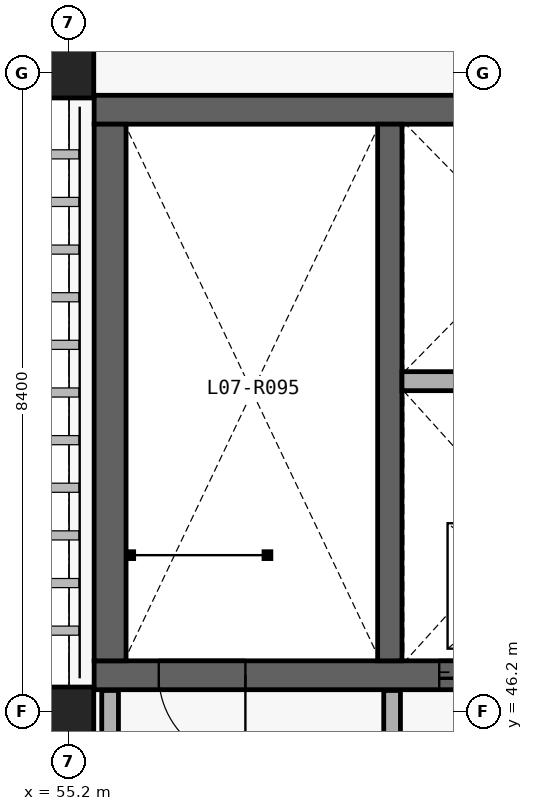
"""IFC4 building model, lengths in metres.
Left out: names, types, materials, properties, quantities, classifications, styles, units other than length and angle.
Written with IfcOpenShell. Run it as: python <this file> out.ifc"""

import sys

from ifc_helpers import new_model, si_unit, direction, frame, frame_2d, origin_with_axes, origin_2d_with_axis, place, context, subcontext, project, spatial, rectangle, circle, extrude, element, fill, save


model = new_model("IFC4")
c1 = context("Model", 3, precision=1e-05, world=origin_with_axes(), true_north=direction((0.0, 1.0)))
c2 = subcontext(c1, "Body", "Model", "MODEL_VIEW")
j1 = project(units=[si_unit("LENGTHUNIT", "METRE"), si_unit("PLANEANGLEUNIT", "RADIAN")], contexts=[c1])
p1 = place(None, origin_with_axes())
s1 = spatial("IfcSite", under=j1, at=p1, CompositionType="ELEMENT")
p2 = place(p1, origin_with_axes())
s2 = spatial("IfcBuilding", under=s1, at=p2, CompositionType="ELEMENT")
p3 = place(p2, frame((0.0, 0.0, 34.5), z_axis=(0.0, 0.0, 1.0), x_axis=(1.0, 0.0, 0.0)))
s3 = spatial("IfcBuildingStorey", under=s2, at=p3, CompositionType="ELEMENT", Elevation=34.5)
p4 = place(None, frame((55.53, 46.68, 34.5), z_axis=(0.0, 0.0, 1.0), x_axis=(1.0, 0.0, 0.0)))
e1 = element("IfcWall", 1, at=p4, inside=s3, PredefinedType="SHEAR", context=c2, shape_type="SweptSolid", body=[
    extrude(rectangle(XDim=7.74, YDim=0.38, at=frame_2d((3.87, 0.0), x_axis=(1.0, 0.0))), origin_with_axes(), (0.0, 0.0, 1.0), 4.5),
])
p5 = place(None, frame((56.95, 46.68, 34.5), z_axis=(0.0, 0.0, 1.0), x_axis=(1.0, 0.0, 0.0)))
e2 = element("IfcOpeningElement", 2, at=p5, cuts=e1, PredefinedType="OPENING", context=c2, shape_type="SweptSolid", body=[
    extrude(rectangle(XDim=1.14, YDim=2.18, at=frame_2d((0.0, 1.09), x_axis=(1.0, 0.0))), frame((0.0, 0.2, 0.0), z_axis=(0.0, -1.0, 0.0), x_axis=(1.0, 0.0, 0.0)), (0.0, 0.0, 1.0), 0.4),
])
p6 = place(None, frame((60.65, 46.68, 34.5), z_axis=(0.0, 0.0, 1.0), x_axis=(1.0, 0.0, 0.0)))
e3 = element("IfcOpeningElement", 3, at=p6, cuts=e1, PredefinedType="OPENING", context=c2, shape_type="SweptSolid", body=[
    extrude(rectangle(XDim=1.16, YDim=2.2, at=frame_2d((0.0, 1.1), x_axis=(1.0, 0.0))), frame((0.0, 0.2, 0.0), z_axis=(0.0, -1.0, 0.0), x_axis=(1.0, 0.0, 0.0)), (0.0, 0.0, 1.0), 0.4),
])
p7 = place(None, frame((63.27, 54.12, 34.5), z_axis=(0.0, 0.0, 1.0), x_axis=(-1.0, 0.0, 0.0)))
e4 = element("IfcWall", 4, at=p7, inside=s3, PredefinedType="SHEAR", context=c2, shape_type="SweptSolid", body=[
    extrude(rectangle(XDim=7.74, YDim=0.38, at=frame_2d((3.87, 0.0), x_axis=(1.0, 0.0))), origin_with_axes(), (0.0, 0.0, 1.0), 4.5),
])
p8 = place(None, frame((55.74, 53.93, 34.5), z_axis=(0.0, 0.0, 1.0), x_axis=(0.0, -1.0, 0.0)))
e5 = element("IfcWall", 5, at=p8, inside=s3, PredefinedType="SHEAR", context=c2, shape_type="SweptSolid", body=[
    extrude(rectangle(XDim=7.06, YDim=0.42, at=frame_2d((3.53, 0.0), x_axis=(1.0, 0.0))), origin_with_axes(), (0.0, 0.0, 1.0), 4.5),
])
p9 = place(None, frame((59.42, 46.87, 34.5), z_axis=(0.0, 0.0, 1.0), x_axis=(0.0, 1.0, 0.0)))
e6 = element("IfcWall", 6, at=p9, inside=s3, PredefinedType="SHEAR", context=c2, shape_type="SweptSolid", body=[
    extrude(rectangle(XDim=7.06, YDim=0.32, at=frame_2d((3.53, 0.0), x_axis=(1.0, 0.0))), origin_with_axes(), (0.0, 0.0, 1.0), 4.5),
])
p10 = place(None, frame((59.58, 50.549, 34.5), z_axis=(0.0, 0.0, 1.0), x_axis=(1.0, 0.0, 0.0)))
e7 = element("IfcWall", 7, at=p10, inside=s3, PredefinedType="PARTITIONING", context=c2, shape_type="SweptSolid", body=[
    extrude(rectangle(XDim=3.27, YDim=0.25, at=frame_2d((1.635, 0.0), x_axis=(1.0, 0.0))), origin_with_axes(), (0.0, 0.0, 1.0), 4.14),
])
for number, where, z_axis, x_axis in (
    (8, (55.74, 45.22, 34.5), (0.0, 0.0, 1.0), (0.0, 1.0, 0.0)),
    (9, (59.45, 45.22, 34.5), (0.0, 0.0, 1.0), (0.0, 1.0, 0.0)),
):
    element("IfcWall", number, at=place(None, frame(where, z_axis=z_axis, x_axis=x_axis)), inside=s3, PredefinedType="PARTITIONING", context=c2, shape_type="SweptSolid", body=[
        extrude(rectangle(XDim=1.26, YDim=0.22, at=frame_2d((0.63, 0.0), x_axis=(1.0, 0.0))), origin_with_axes(), (0.0, 0.0, 1.0), 4.14),
    ])
for number, where, z_axis, x_axis in (
    (10, (55.2, 46.2, 34.5), (0.0, 0.0, 1.0), (1.0, 0.0, 0.0)),
    (11, (55.2, 54.6, 34.5), (0.0, 0.0, 1.0), (1.0, 0.0, 0.0)),
):
    element("IfcColumn", number, at=place(None, frame(where, z_axis=z_axis, x_axis=x_axis)), inside=s3, PredefinedType="COLUMN", context=c2, shape_type="SweptSolid", body=[
        extrude(circle(Radius=0.325, at=origin_2d_with_axis()), origin_with_axes(), (0.0, 0.0, 1.0), 4.5),
    ])
p11 = place(None, frame((56.95, 46.68, 34.5), z_axis=(0.0, 0.0, 1.0), x_axis=(-1.0, 0.0, 0.0)))
e12 = element("IfcDoor", 12, at=p11, inside=s3, OperationType="SINGLE_SWING_RIGHT", PredefinedType="DOOR", context=c2, shape_type="SweptSolid", body=[
    extrude(rectangle(XDim=1.14, YDim=2.18, at=frame_2d((0.0, 1.09), x_axis=(1.0, 0.0))), frame((0.0, 0.04, 0.0), z_axis=(0.0, -1.0, 0.0), x_axis=(1.0, 0.0, 0.0)), (0.0, 0.0, 1.0), 0.08),
])
fill(e2, e12)
p12 = place(None, frame((60.65, 46.68, 34.5), z_axis=(0.0, 0.0, 1.0), x_axis=(-1.0, 0.0, 0.0)))
e13 = element("IfcDoor", 13, at=p12, inside=s3, OperationType="SLIDING_TO_LEFT", PredefinedType="DOOR", context=c2, shape_type="SweptSolid", body=[
    extrude(rectangle(XDim=1.16, YDim=2.2, at=frame_2d((0.0, 1.1), x_axis=(1.0, 0.0))), frame((0.0, 0.04, 0.0), z_axis=(0.0, -1.0, 0.0), x_axis=(1.0, 0.0, 0.0)), (0.0, 0.0, 1.0), 0.08),
])
fill(e3, e13)
save(model, sys.argv[1])
